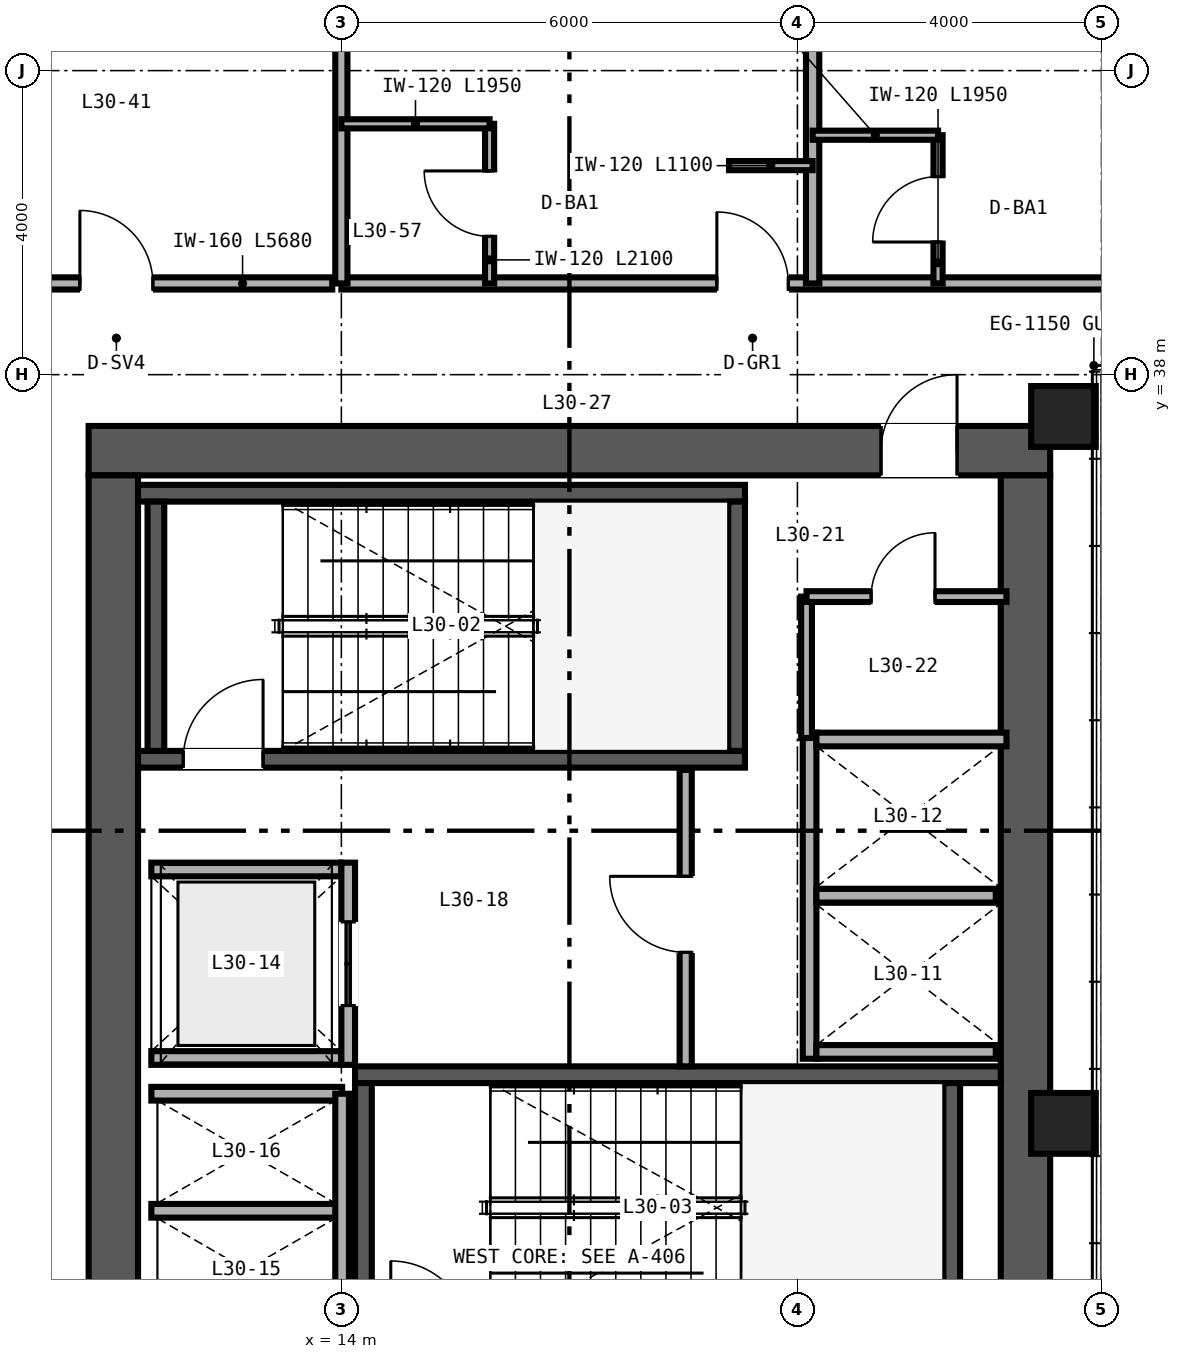
"""IFC4 building model, lengths in metres.
Left out: names, types, materials, properties, quantities, classifications, styles, units other than length and angle.
Written with IfcOpenShell. Run it as: python <this file> out.ifc"""

import sys

from ifc_helpers import new_model, si_unit, direction, frame, frame_2d, origin, origin_2d, place, context, subcontext, project, spatial, rectangle, hollow_rectangle, extrude, source, transform, mapped, element, fill, save


model = new_model("IFC4")
c1 = context("Model", 3, precision=1e-05, world=origin(), true_north=direction((0.0, 1.0)))
c2 = subcontext(c1, "Body", "Model", "MODEL_VIEW")
j1 = project(units=[si_unit("LENGTHUNIT", "METRE"), si_unit("PLANEANGLEUNIT", "RADIAN")], contexts=[c1])
p1 = place(None, origin())
s1 = spatial("IfcSite", under=j1, at=p1, CompositionType="ELEMENT")
p2 = place(p1, origin())
s2 = spatial("IfcBuilding", under=s1, at=p2, CompositionType="ELEMENT")
p3 = place(p2, frame((0.0, 0.0, 122.4)))
s3 = spatial("IfcBuildingStorey", under=s2, at=p3, CompositionType="ELEMENT", Elevation=122.4)
p4 = place(p3, frame((10.675, 37.0, 0.0), z_axis=(0.0, 0.0, 1.0), x_axis=(1.0, 0.0, 0.0)))
e1 = element("IfcWall", 1, at=p4, inside=s3, PredefinedType="SHEAR", context=c2, shape_type="SweptSolid", body=[
    extrude(rectangle(XDim=12.65, YDim=0.65, at=frame_2d((6.325, 0.0))), origin(), (0.0, 0.0, 1.0), 3.36),
])
p5 = place(p4, frame((10.425, 0.0, 0.0)))
e2 = element("IfcOpeningElement", 2, at=p5, cuts=e1, PredefinedType="OPENING", context=c2, shape_type="SweptSolid", body=[
    extrude(rectangle(XDim=1.0, YDim=2.15, at=frame_2d((0.5, 1.075))), frame((0.0, 0.335, 0.0), z_axis=(0.0, -1.0, 0.0), x_axis=(1.0, 0.0, 0.0)), (0.0, 0.0, 1.0), 0.67),
])
for number, where, z_axis, x_axis in (
    (3, (11.0, 15.325, 0.0), (0.0, 0.0, 1.0), (0.0, 1.0, 0.0)),
    (4, (23.0, 15.325, 0.0), (0.0, 0.0, 1.0), (0.0, 1.0, 0.0)),
):
    element("IfcWall", number, at=place(p3, frame(where, z_axis=z_axis, x_axis=x_axis)), inside=s3, PredefinedType="SHEAR", context=c2, shape_type="SweptSolid", body=[
        extrude(rectangle(XDim=21.35, YDim=0.65, at=frame_2d((10.675, 0.0))), origin(), (0.0, 0.0, 1.0), 3.36),
    ])
p6 = place(p3, frame((11.325, 32.94, 0.0), z_axis=(0.0, 0.0, 1.0), x_axis=(1.0, 0.0, 0.0)))
e5 = element("IfcWall", 5, at=p6, inside=s3, PredefinedType="SHEAR", context=c2, shape_type="SweptSolid", body=[
    extrude(rectangle(XDim=7.985, YDim=0.22, at=frame_2d((3.993, 0.0))), origin(), (0.0, 0.0, 1.0), 3.4),
])
p7 = place(p6, frame((0.595, 0.0, 0.0)))
e6 = element("IfcOpeningElement", 6, at=p7, cuts=e5, PredefinedType="OPENING", context=c2, shape_type="SweptSolid", body=[
    extrude(rectangle(XDim=1.05, YDim=2.15, at=frame_2d((0.525, 1.075))), frame((0.0, 0.12, 0.0), z_axis=(0.0, -1.0, 0.0), x_axis=(1.0, 0.0, 0.0)), (0.0, 0.0, 1.0), 0.24),
])
p8 = place(p3, frame((11.325, 36.44, 0.0), z_axis=(0.0, 0.0, 1.0), x_axis=(1.0, 0.0, 0.0)))
e7 = element("IfcWall", 7, at=p8, inside=s3, PredefinedType="SHEAR", context=c2, shape_type="SweptSolid", body=[
    extrude(rectangle(XDim=7.985, YDim=0.22, at=frame_2d((3.993, 0.0))), origin(), (0.0, 0.0, 1.0), 3.4),
])
for number, where, z_axis, x_axis in (
    (8, (11.56, 33.05, 0.0), (0.0, 0.0, 1.0), (0.0, 1.0, 0.0)),
    (9, (19.2, 33.05, 0.0), (0.0, 0.0, 1.0), (0.0, 1.0, 0.0)),
):
    element("IfcWall", number, at=place(p3, frame(where, z_axis=z_axis, x_axis=x_axis)), inside=s3, PredefinedType="SHEAR", context=c2, shape_type="SweptSolid", body=[
        extrude(rectangle(XDim=3.28, YDim=0.22, at=frame_2d((1.64, 0.0))), origin(), (0.0, 0.0, 1.0), 3.4),
    ])
p9 = place(p3, frame((14.18, 28.79, 0.0), z_axis=(0.0, 0.0, 1.0), x_axis=(1.0, 0.0, 0.0)))
e10 = element("IfcWall", 10, at=p9, inside=s3, PredefinedType="SHEAR", context=c2, shape_type="SweptSolid", body=[
    extrude(rectangle(XDim=8.495, YDim=0.22, at=frame_2d((4.248, 0.0))), origin(), (0.0, 0.0, 1.0), 3.4),
])
for number, where, z_axis, x_axis in (
    (11, (14.29, 25.4, 0.0), (0.0, 0.0, 1.0), (0.0, 1.0, 0.0)),
    (12, (22.03, 25.4, 0.0), (0.0, 0.0, 1.0), (0.0, 1.0, 0.0)),
):
    element("IfcWall", number, at=place(p3, frame(where, z_axis=z_axis, x_axis=x_axis)), inside=s3, PredefinedType="SHEAR", context=c2, shape_type="SweptSolid", body=[
        extrude(rectangle(XDim=3.28, YDim=0.22, at=frame_2d((1.64, 0.0))), origin(), (0.0, 0.0, 1.0), 3.4),
    ])
m1 = source(origin(), c2, "Body", "SweptSolid", [
    extrude(hollow_rectangle(XDim=0.85, YDim=0.8, WallThickness=0.032, at=origin_2d()), origin(), (0.0, 0.0, 1.0), 3.36),
])
for number, where, z_axis, x_axis in (
    (13, (23.5, 28.15, 0.0), (0.0, 0.0, 1.0), (1.0, 0.0, 0.0)),
    (14, (23.5, 37.45, 0.0), (0.0, 0.0, 1.0), (1.0, 0.0, 0.0)),
):
    element("IfcColumn", number, at=place(p3, frame(where, z_axis=z_axis, x_axis=x_axis)), inside=s3, PredefinedType="COLUMN", context=c2, shape_type="MappedRepresentation", body=[
        mapped(m1, transform((0.0, 0.0, 0.0), scale=1.0)),
    ])
p10 = place(p3, frame((20.16, 29.0, 0.0), z_axis=(0.0, 0.0, 1.0), x_axis=(0.0, 1.0, 0.0)))
e15 = element("IfcWall", 15, at=p10, inside=s3, PredefinedType="SOLIDWALL", context=c2, shape_type="SweptSolid", body=[
    extrude(rectangle(XDim=4.29, YDim=0.18, at=frame_2d((2.145, 0.0))), origin(), (0.0, 0.0, 1.0), 3.36),
])
p11 = place(p3, frame((20.25, 29.09, 0.0), z_axis=(0.0, 0.0, 1.0), x_axis=(1.0, 0.0, 0.0)))
e16 = element("IfcWall", 16, at=p11, inside=s3, PredefinedType="SOLIDWALL", context=c2, shape_type="SweptSolid", body=[
    extrude(rectangle(XDim=2.36, YDim=0.18, at=frame_2d((1.18, 0.0))), origin(), (0.0, 0.0, 1.0), 3.36),
])
p12 = place(p3, frame((20.25, 33.2, 0.0), z_axis=(0.0, 0.0, 1.0), x_axis=(1.0, 0.0, 0.0)))
e17 = element("IfcWall", 17, at=p12, inside=s3, PredefinedType="SOLIDWALL", context=c2, shape_type="SweptSolid", body=[
    extrude(rectangle(XDim=2.5, YDim=0.18, at=frame_2d((1.25, 0.0))), origin(), (0.0, 0.0, 1.0), 3.36),
])
p13 = place(p3, frame((20.25, 31.145, 0.0), z_axis=(0.0, 0.0, 1.0), x_axis=(1.0, 0.0, 0.0)))
e18 = element("IfcWall", 18, at=p13, inside=s3, PredefinedType="SOLIDWALL", context=c2, shape_type="SweptSolid", body=[
    extrude(rectangle(XDim=2.36, YDim=0.18, at=frame_2d((1.18, 0.0))), origin(), (0.0, 0.0, 1.0), 3.36),
])
for number, where, z_axis, x_axis in (
    (19, (11.5, 29.01, 0.0), (0.0, 0.0, 1.0), (1.0, 0.0, 0.0)),
    (20, (11.5, 31.49, 0.0), (0.0, 0.0, 1.0), (1.0, 0.0, 0.0)),
):
    element("IfcWall", number, at=place(p3, frame(where, z_axis=z_axis, x_axis=x_axis)), inside=s3, PredefinedType="SOLIDWALL", context=c2, shape_type="SweptSolid", body=[
        extrude(rectangle(XDim=2.5, YDim=0.18, at=frame_2d((1.25, 0.0))), origin(), (0.0, 0.0, 1.0), 3.36),
    ])
p14 = place(p3, frame((14.09, 28.92, 0.0), z_axis=(0.0, 0.0, 1.0), x_axis=(0.0, 1.0, 0.0)))
e21 = element("IfcWall", 21, at=p14, inside=s3, PredefinedType="SOLIDWALL", context=c2, shape_type="SweptSolid", body=[
    extrude(rectangle(XDim=2.66, YDim=0.18, at=frame_2d((1.33, 0.0))), origin(), (0.0, 0.0, 1.0), 3.36),
])
p15 = place(p14, frame((0.78, 0.0, 0.0)))
e22 = element("IfcOpeningElement", 22, at=p15, cuts=e21, PredefinedType="OPENING", context=c2, shape_type="SweptSolid", body=[
    extrude(rectangle(XDim=1.1, YDim=2.2, at=frame_2d((0.55, 1.1))), frame((0.0, 0.1, 0.0), z_axis=(0.0, -1.0, 0.0), x_axis=(1.0, 0.0, 0.0)), (0.0, 0.0, 1.0), 0.2),
])
for number, where, z_axis, x_axis in (
    (23, (11.5, 27.0, 0.0), (0.0, 0.0, 1.0), (1.0, 0.0, 0.0)),
    (24, (11.5, 28.54, 0.0), (0.0, 0.0, 1.0), (1.0, 0.0, 0.0)),
):
    element("IfcWall", number, at=place(p3, frame(where, z_axis=z_axis, x_axis=x_axis)), inside=s3, PredefinedType="SOLIDWALL", context=c2, shape_type="SweptSolid", body=[
        extrude(rectangle(XDim=2.51, YDim=0.18, at=frame_2d((1.255, 0.0))), origin(), (0.0, 0.0, 1.0), 3.36),
    ])
p16 = place(p3, frame((14.01, 25.46, 0.0), z_axis=(0.0, 0.0, 1.0), x_axis=(0.0, 1.0, 0.0)))
e25 = element("IfcWall", 25, at=p16, inside=s3, PredefinedType="SOLIDWALL", context=c2, shape_type="SweptSolid", body=[
    extrude(rectangle(XDim=3.08, YDim=0.18, at=frame_2d((1.54, 0.0))), origin(), (0.0, 0.0, 1.0), 3.36),
])
p17 = place(p3, frame((18.53, 28.9, 0.0), z_axis=(0.0, 0.0, 1.0), x_axis=(0.0, 1.0, 0.0)))
e26 = element("IfcWall", 26, at=p17, inside=s3, PredefinedType="PARTITIONING", context=c2, shape_type="SweptSolid", body=[
    extrude(rectangle(XDim=3.9, YDim=0.16, at=frame_2d((1.95, 0.0))), origin(), (0.0, 0.0, 1.0), 3.36),
])
p18 = place(p17, frame((1.5, 0.0, 0.0)))
e27 = element("IfcOpeningElement", 27, at=p18, cuts=e26, PredefinedType="OPENING", context=c2, shape_type="SweptSolid", body=[
    extrude(rectangle(XDim=1.0, YDim=2.15, at=frame_2d((0.5, 1.075))), frame((0.0, 0.09, 0.0), z_axis=(0.0, -1.0, 0.0), x_axis=(1.0, 0.0, 0.0)), (0.0, 0.0, 1.0), 0.18),
])
p19 = place(p3, frame((20.12, 33.22, 0.0), z_axis=(0.0, 0.0, 1.0), x_axis=(0.0, 1.0, 0.0)))
e28 = element("IfcWall", 28, at=p19, inside=s3, PredefinedType="PARTITIONING", context=c2, shape_type="SweptSolid", body=[
    extrude(rectangle(XDim=1.86, YDim=0.142, at=frame_2d((0.93, 0.0))), origin(), (0.0, 0.0, 1.0), 3.36),
])
p20 = place(p3, frame((20.12, 35.08, 0.0), z_axis=(0.0, 0.0, 1.0), x_axis=(1.0, 0.0, 0.0)))
e29 = element("IfcWall", 29, at=p20, inside=s3, PredefinedType="PARTITIONING", context=c2, shape_type="SweptSolid", body=[
    extrude(rectangle(XDim=2.63, YDim=0.142, at=frame_2d((1.315, 0.0))), origin(), (0.0, 0.0, 1.0), 3.36),
])
p21 = place(p20, frame((0.85, 0.0, 0.0)))
e30 = element("IfcOpeningElement", 30, at=p21, cuts=e29, PredefinedType="OPENING", context=c2, shape_type="SweptSolid", body=[
    extrude(rectangle(XDim=0.84, YDim=2.1, at=frame_2d((0.42, 1.05))), frame((0.0, 0.081, 0.0), z_axis=(0.0, -1.0, 0.0), x_axis=(1.0, 0.0, 0.0)), (0.0, 0.0, 1.0), 0.162),
])
p22 = place(p3, frame((8.2, 39.2, 0.0), z_axis=(0.0, 0.0, 1.0), x_axis=(1.0, 0.0, 0.0)))
e31 = element("IfcWall", 31, at=p22, inside=s3, PredefinedType="PARTITIONING", context=c2, shape_type="SweptSolid", body=[
    extrude(rectangle(XDim=5.68, YDim=0.16, at=frame_2d((2.84, 0.0))), origin(), (0.0, 0.0, 1.0), 3.36),
])
p23 = place(p22, frame((2.36, 0.0, 0.0)))
e32 = element("IfcOpeningElement", 32, at=p23, cuts=e31, PredefinedType="OPENING", context=c2, shape_type="SweptSolid", body=[
    extrude(rectangle(XDim=0.96, YDim=2.15, at=frame_2d((0.48, 1.075))), frame((0.0, 0.09, 0.0), z_axis=(0.0, -1.0, 0.0), x_axis=(1.0, 0.0, 0.0)), (0.0, 0.0, 1.0), 0.18),
])
p24 = place(p3, frame((14.0, 39.2, 0.0), z_axis=(0.0, 0.0, 1.0), x_axis=(1.0, 0.0, 0.0)))
e33 = element("IfcWall", 33, at=p24, inside=s3, PredefinedType="PARTITIONING", context=c2, shape_type="SweptSolid", body=[
    extrude(rectangle(XDim=36.0, YDim=0.16, at=frame_2d((18.0, 0.0))), origin(), (0.0, 0.0, 1.0), 2.581),
])
p25 = place(p24, frame((4.94, 0.0, 0.0)))
e34 = element("IfcOpeningElement", 34, at=p25, cuts=e33, PredefinedType="OPENING", context=c2, shape_type="SweptSolid", body=[
    extrude(rectangle(XDim=0.94, YDim=2.15, at=frame_2d((0.47, 1.075))), frame((0.0, 0.09, 0.0), z_axis=(0.0, -1.0, 0.0), x_axis=(1.0, 0.0, 0.0)), (0.0, 0.0, 1.0), 0.18),
])
p26 = place(p24, frame((11.14, 0.0, 0.0)))
e35 = element("IfcOpeningElement", 35, at=p26, cuts=e33, PredefinedType="OPENING", context=c2, shape_type="SweptSolid", body=[
    extrude(rectangle(XDim=0.94, YDim=2.15, at=frame_2d((0.47, 1.075))), frame((0.0, 0.09, 0.0), z_axis=(0.0, -1.0, 0.0), x_axis=(1.0, 0.0, 0.0)), (0.0, 0.0, 1.0), 0.18),
])
p27 = place(p24, frame((15.12, 0.0, 0.0)))
e36 = element("IfcOpeningElement", 36, at=p27, cuts=e33, PredefinedType="OPENING", context=c2, shape_type="SweptSolid", body=[
    extrude(rectangle(XDim=0.96, YDim=2.15, at=frame_2d((0.48, 1.075))), frame((0.0, 0.09, 0.0), z_axis=(0.0, -1.0, 0.0), x_axis=(1.0, 0.0, 0.0)), (0.0, 0.0, 1.0), 0.18),
])
p28 = place(p24, frame((21.42, 0.0, 0.0)))
e37 = element("IfcOpeningElement", 37, at=p28, cuts=e33, PredefinedType="OPENING", context=c2, shape_type="SweptSolid", body=[
    extrude(rectangle(XDim=0.96, YDim=2.15, at=frame_2d((0.48, 1.075))), frame((0.0, 0.09, 0.0), z_axis=(0.0, -1.0, 0.0), x_axis=(1.0, 0.0, 0.0)), (0.0, 0.0, 1.0), 0.18),
])
p29 = place(p24, frame((29.34, 0.0, 0.0)))
e38 = element("IfcOpeningElement", 38, at=p29, cuts=e33, PredefinedType="OPENING", context=c2, shape_type="SweptSolid", body=[
    extrude(rectangle(XDim=0.94, YDim=2.15, at=frame_2d((0.47, 1.075))), frame((0.0, 0.09, 0.0), z_axis=(0.0, -1.0, 0.0), x_axis=(1.0, 0.0, 0.0)), (0.0, 0.0, 1.0), 0.18),
])
p30 = place(p24, frame((34.74, 0.0, 0.0)))
e39 = element("IfcOpeningElement", 39, at=p30, cuts=e33, PredefinedType="OPENING", context=c2, shape_type="SweptSolid", body=[
    extrude(rectangle(XDim=0.94, YDim=2.15, at=frame_2d((0.47, 1.075))), frame((0.0, 0.09, 0.0), z_axis=(0.0, -1.0, 0.0), x_axis=(1.0, 0.0, 0.0)), (0.0, 0.0, 1.0), 0.18),
])
p31 = place(p3, frame((14.0, 39.2, 0.0), z_axis=(0.0, 0.0, 1.0), x_axis=(0.0, 1.0, 0.0)))
e40 = element("IfcWall", 40, at=p31, inside=s3, PredefinedType="PARTITIONING", context=c2, shape_type="SweptSolid", body=[
    extrude(rectangle(XDim=10.44, YDim=0.16, at=frame_2d((5.22, 0.0))), origin(), (0.0, 0.0, 1.0), 2.667),
])
p32 = place(p3, frame((20.2, 39.2, 0.0), z_axis=(0.0, 0.0, 1.0), x_axis=(0.0, 1.0, 0.0)))
e41 = element("IfcWall", 41, at=p32, inside=s3, PredefinedType="PARTITIONING", context=c2, shape_type="SweptSolid", body=[
    extrude(rectangle(XDim=10.44, YDim=0.175, at=frame_2d((5.22, 0.0))), origin(), (0.0, 0.0, 1.0), 2.667),
])
p33 = place(p3, frame((15.95, 39.2, 0.0), z_axis=(0.0, 0.0, 1.0), x_axis=(0.0, 1.0, 0.0)))
e42 = element("IfcWall", 42, at=p33, inside=s3, PredefinedType="PARTITIONING", context=c2, shape_type="SweptSolid", body=[
    extrude(rectangle(XDim=2.1, YDim=0.12, at=frame_2d((1.05, 0.0))), origin(), (0.0, 0.0, 1.0), 3.36),
])
p34 = place(p33, frame((0.62, 0.0, 0.0)))
e43 = element("IfcOpeningElement", 43, at=p34, cuts=e42, PredefinedType="OPENING", context=c2, shape_type="SweptSolid", body=[
    extrude(rectangle(XDim=0.86, YDim=2.1, at=frame_2d((0.43, 1.05))), frame((0.0, 0.07, 0.0), z_axis=(0.0, -1.0, 0.0), x_axis=(1.0, 0.0, 0.0)), (0.0, 0.0, 1.0), 0.14),
])
p35 = place(p3, frame((14.0, 41.3, 0.0), z_axis=(0.0, 0.0, 1.0), x_axis=(1.0, 0.0, 0.0)))
e44 = element("IfcWall", 44, at=p35, inside=s3, PredefinedType="PARTITIONING", context=c2, shape_type="SweptSolid", body=[
    extrude(rectangle(XDim=1.95, YDim=0.12, at=frame_2d((0.975, 0.0))), origin(), (0.0, 0.0, 1.0), 3.36),
])
p36 = place(p3, frame((19.1, 40.75, 0.0), z_axis=(0.0, 0.0, 1.0), x_axis=(1.0, 0.0, 0.0)))
e45 = element("IfcWall", 45, at=p36, inside=s3, PredefinedType="PARTITIONING", context=c2, shape_type="SweptSolid", body=[
    extrude(rectangle(XDim=1.1, YDim=0.12, at=frame_2d((0.55, 0.0))), origin(), (0.0, 0.0, 1.0), 3.36),
])
p37 = place(p3, frame((21.85, 39.2, 0.0), z_axis=(0.0, 0.0, 1.0), x_axis=(0.0, 1.0, 0.0)))
e46 = element("IfcWall", 46, at=p37, inside=s3, PredefinedType="PARTITIONING", context=c2, shape_type="SweptSolid", body=[
    extrude(rectangle(XDim=1.95, YDim=0.12, at=frame_2d((0.975, 0.0))), origin(), (0.0, 0.0, 1.0), 3.36),
])
p38 = place(p37, frame((0.545, 0.0, 0.0)))
e47 = element("IfcOpeningElement", 47, at=p38, cuts=e46, PredefinedType="OPENING", context=c2, shape_type="SweptSolid", body=[
    extrude(rectangle(XDim=0.86, YDim=2.1, at=frame_2d((0.43, 1.05))), frame((0.0, 0.07, 0.0), z_axis=(0.0, -1.0, 0.0), x_axis=(1.0, 0.0, 0.0)), (0.0, 0.0, 1.0), 0.14),
])
p39 = place(p3, frame((20.2, 41.15, 0.0), z_axis=(0.0, 0.0, 1.0), x_axis=(1.0, 0.0, 0.0)))
e48 = element("IfcWall", 48, at=p39, inside=s3, PredefinedType="PARTITIONING", context=c2, shape_type="SweptSolid", body=[
    extrude(rectangle(XDim=1.65, YDim=0.12, at=frame_2d((0.825, 0.0))), origin(), (0.0, 0.0, 1.0), 3.36),
])
m2 = source(origin(), c2, "Body", "SweptSolid", [
    extrude(rectangle(XDim=1.05, YDim=2.15, at=frame_2d((0.525, 1.075))), frame((0.0, 0.025, 0.0), z_axis=(0.0, -1.0, 0.0), x_axis=(1.0, 0.0, 0.0)), (0.0, 0.0, 1.0), 0.05),
])
p40 = place(p7, origin())
e49 = element("IfcDoor", 49, at=p40, inside=s3, OperationType="SINGLE_SWING_RIGHT", PredefinedType="DOOR", context=c2, shape_type="MappedRepresentation", body=[
    mapped(m2, transform((0.0, 0.0, 0.0), scale=1.0)),
])
fill(e6, e49)
m3 = source(origin(), c2, "Body", "SweptSolid", [
    extrude(rectangle(XDim=1.1, YDim=2.2, at=frame_2d((0.55, 1.1))), frame((0.0, 0.025, 0.0), z_axis=(0.0, -1.0, 0.0), x_axis=(1.0, 0.0, 0.0)), (0.0, 0.0, 1.0), 0.05),
])
p41 = place(p15, origin())
e50 = element("IfcDoor", 50, at=p41, inside=s3, OperationType="DOUBLE_DOOR_SLIDING", PredefinedType="DOOR", context=c2, shape_type="MappedRepresentation", body=[
    mapped(m3, transform((0.0, 0.0, 0.0), scale=1.0)),
])
fill(e22, e50)
m4 = source(origin(), c2, "Body", "SweptSolid", [
    extrude(rectangle(XDim=1.0, YDim=2.15, at=frame_2d((0.5, 1.075))), frame((0.0, 0.025, 0.0), z_axis=(0.0, -1.0, 0.0), x_axis=(1.0, 0.0, 0.0)), (0.0, 0.0, 1.0), 0.05),
])
p42 = place(p18, origin())
e51 = element("IfcDoor", 51, at=p42, inside=s3, OperationType="SINGLE_SWING_RIGHT", PredefinedType="DOOR", context=c2, shape_type="MappedRepresentation", body=[
    mapped(m4, transform((0.0, 0.0, 0.0), scale=1.0)),
])
fill(e27, e51)
m5 = source(origin(), c2, "Body", "SweptSolid", [
    extrude(rectangle(XDim=0.84, YDim=2.1, at=frame_2d((0.42, 1.05))), frame((0.0, 0.025, 0.0), z_axis=(0.0, -1.0, 0.0), x_axis=(1.0, 0.0, 0.0)), (0.0, 0.0, 1.0), 0.05),
])
p43 = place(p21, origin())
e52 = element("IfcDoor", 52, at=p43, inside=s3, OperationType="SINGLE_SWING_RIGHT", PredefinedType="DOOR", context=c2, shape_type="MappedRepresentation", body=[
    mapped(m5, transform((0.0, 0.0, 0.0), scale=1.0)),
])
fill(e30, e52)
p44 = place(p5, origin())
e53 = element("IfcDoor", 53, at=p44, inside=s3, OperationType="SINGLE_SWING_RIGHT", PredefinedType="DOOR", context=c2, shape_type="MappedRepresentation", body=[
    mapped(m4, transform((0.0, 0.0, 0.0), scale=1.0)),
])
fill(e2, e53)
m6 = source(origin(), c2, "Body", "SweptSolid", [
    extrude(rectangle(XDim=0.96, YDim=2.15, at=frame_2d((0.48, 1.075))), frame((0.0, 0.025, 0.0), z_axis=(0.0, -1.0, 0.0), x_axis=(1.0, 0.0, 0.0)), (0.0, 0.0, 1.0), 0.05),
])
p45 = place(p23, origin())
e54 = element("IfcDoor", 54, at=p45, inside=s3, OperationType="SINGLE_SWING_LEFT", PredefinedType="DOOR", context=c2, shape_type="MappedRepresentation", body=[
    mapped(m6, transform((0.0, 0.0, 0.0), scale=1.0)),
])
fill(e32, e54)
m7 = source(origin(), c2, "Body", "SweptSolid", [
    extrude(rectangle(XDim=0.86, YDim=2.1, at=frame_2d((0.43, 1.05))), frame((0.0, 0.025, 0.0), z_axis=(0.0, -1.0, 0.0), x_axis=(1.0, 0.0, 0.0)), (0.0, 0.0, 1.0), 0.05),
])
p46 = place(p34, origin())
e55 = element("IfcDoor", 55, at=p46, inside=s3, OperationType="SINGLE_SWING_RIGHT", PredefinedType="DOOR", context=c2, shape_type="MappedRepresentation", body=[
    mapped(m7, transform((0.0, 0.0, 0.0), scale=1.0)),
])
fill(e43, e55)
p47 = place(p38, origin())
e56 = element("IfcDoor", 56, at=p47, inside=s3, OperationType="SINGLE_SWING_LEFT", PredefinedType="DOOR", context=c2, shape_type="MappedRepresentation", body=[
    mapped(m7, transform((0.0, 0.0, 0.0), scale=1.0)),
])
fill(e47, e56)
m8 = source(origin(), c2, "Body", "SweptSolid", [
    extrude(rectangle(XDim=0.94, YDim=2.15, at=frame_2d((0.47, 1.075))), frame((0.0, 0.025, 0.0), z_axis=(0.0, -1.0, 0.0), x_axis=(1.0, 0.0, 0.0)), (0.0, 0.0, 1.0), 0.05),
])
p48 = place(p25, origin())
e57 = element("IfcDoor", 57, at=p48, inside=s3, OperationType="SINGLE_SWING_LEFT", PredefinedType="DOOR", context=c2, shape_type="MappedRepresentation", body=[
    mapped(m8, transform((0.0, 0.0, 0.0), scale=1.0)),
])
fill(e34, e57)
save(model, sys.argv[1])
